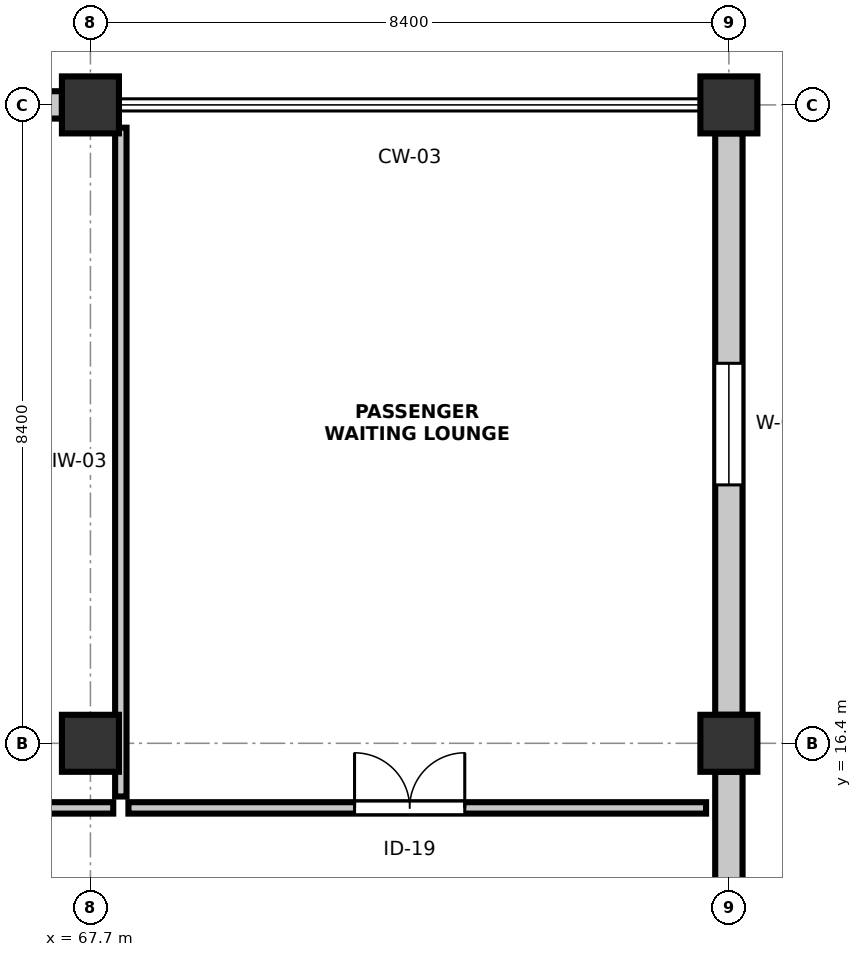
"""IFC4 building model, lengths in metres.
Left out: names, types, materials, properties, quantities, classifications, styles, units other than length and angle.
Written with IfcOpenShell. Run it as: python <this file> out.ifc"""

import sys

from ifc_helpers import new_model, si_unit, direction, frame, frame_2d, origin, origin_2d, place, context, subcontext, project, spatial, rectangle, extrude, element, fill, save


model = new_model("IFC4")
c1 = context("Model", 3, precision=1e-05, world=origin(), true_north=direction((0.0, 1.0)))
c2 = subcontext(c1, "Body", "Model", "MODEL_VIEW")
j1 = project(units=[si_unit("LENGTHUNIT", "METRE"), si_unit("PLANEANGLEUNIT", "RADIAN")], contexts=[c1])
p1 = place(None, origin())
s1 = spatial("IfcSite", under=j1, at=p1, CompositionType="ELEMENT")
p2 = place(p1, origin())
s2 = spatial("IfcBuilding", under=s1, at=p2, CompositionType="ELEMENT")
p3 = place(p2, origin())
s3 = spatial("IfcBuildingStorey", under=s2, at=p3, CompositionType="ELEMENT", Elevation=0.0)
for number, where, z_axis, x_axis in (
    (1, (67.7, 16.4, 0.0), (0.0, 0.0, 1.0), (1.0, 0.0, 0.0)),
    (2, (67.7, 24.8, 0.0), (0.0, 0.0, 1.0), (1.0, 0.0, 0.0)),
    (3, (76.1, 16.4, 0.0), (0.0, 0.0, 1.0), (1.0, 0.0, 0.0)),
    (4, (76.1, 24.8, 0.0), (0.0, 0.0, 1.0), (1.0, 0.0, 0.0)),
):
    element("IfcColumn", number, at=place(p3, frame(where, z_axis=z_axis, x_axis=x_axis)), inside=s3, PredefinedType="COLUMN", context=c2, shape_type="SweptSolid", body=[
        extrude(rectangle(XDim=0.75, YDim=0.75, at=origin_2d()), origin(), (0.0, 0.0, 1.0), 4.8),
    ])
p4 = place(p3, frame((76.1, 8.375, 0.0), z_axis=(0.0, 0.0, 1.0), x_axis=(0.0, 1.0, 0.0)))
e5 = element("IfcWall", 5, at=p4, inside=s3, PredefinedType="STANDARD", context=c2, shape_type="SweptSolid", body=[
    extrude(rectangle(XDim=7.65, YDim=0.36, at=frame_2d((3.825, 0.0))), origin(), (0.0, 0.0, 1.0), 3.785),
])
p5 = place(p4, frame((3.15, 0.0, 0.95)))
e6 = element("IfcOpeningElement", 6, at=p5, cuts=e5, PredefinedType="OPENING", context=c2, shape_type="SweptSolid", body=[
    extrude(rectangle(XDim=1.35, YDim=2.15, at=frame_2d((0.675, 1.075))), frame((0.0, 0.19, 0.0), z_axis=(0.0, -1.0, 0.0), x_axis=(1.0, 0.0, 0.0)), (0.0, 0.0, 1.0), 0.38),
])
p6 = place(p3, frame((76.1, 16.775, 0.0), z_axis=(0.0, 0.0, 1.0), x_axis=(0.0, 1.0, 0.0)))
e7 = element("IfcWall", 7, at=p6, inside=s3, PredefinedType="STANDARD", context=c2, shape_type="SweptSolid", body=[
    extrude(rectangle(XDim=7.65, YDim=0.36, at=frame_2d((3.825, 0.0))), origin(), (0.0, 0.0, 1.0), 3.785),
])
p7 = place(p6, frame((3.025, 0.0, 0.95)))
e8 = element("IfcOpeningElement", 8, at=p7, cuts=e7, PredefinedType="OPENING", context=c2, shape_type="SweptSolid", body=[
    extrude(rectangle(XDim=1.6, YDim=1.45, at=frame_2d((0.8, 0.725))), frame((0.0, 0.19, 0.0), z_axis=(0.0, -1.0, 0.0), x_axis=(1.0, 0.0, 0.0)), (0.0, 0.0, 1.0), 0.38),
])
p8 = place(p3, frame((67.325, 24.8, 0.0), z_axis=(0.0, 0.0, 1.0), x_axis=(-1.0, 0.0, 0.0)))
e9 = element("IfcWall", 9, at=p8, inside=s3, PredefinedType="STANDARD", context=c2, shape_type="SweptSolid", body=[
    extrude(rectangle(XDim=7.65, YDim=0.36, at=frame_2d((3.825, 0.0))), origin(), (0.0, 0.0, 1.0), 3.785),
])
p9 = place(p8, frame((2.875, 0.0, 0.0)))
e10 = element("IfcOpeningElement", 10, at=p9, cuts=e9, PredefinedType="OPENING", context=c2, shape_type="SweptSolid", body=[
    extrude(rectangle(XDim=1.9, YDim=2.3, at=frame_2d((0.95, 1.15))), frame((0.0, 0.19, 0.0), z_axis=(0.0, -1.0, 0.0), x_axis=(1.0, 0.0, 0.0)), (0.0, 0.0, 1.0), 0.38),
])
p10 = place(p3, frame((60.6, 15.55, 0.0), z_axis=(0.0, 0.0, 1.0), x_axis=(1.0, 0.0, 0.0)))
e11 = element("IfcWall", 11, at=p10, inside=s3, PredefinedType="PARTITIONING", context=c2, shape_type="SweptSolid", body=[
    extrude(rectangle(XDim=7.4, YDim=0.15, at=frame_2d((3.7, 0.0))), origin(), (0.0, 0.0, 1.0), 4.535),
])
p11 = place(p10, frame((2.5, 0.0, 0.0)))
e12 = element("IfcOpeningElement", 12, at=p11, cuts=e11, PredefinedType="OPENING", context=c2, shape_type="SweptSolid", body=[
    extrude(rectangle(XDim=1.4, YDim=2.2, at=frame_2d((0.7, 1.1))), frame((0.0, 0.085, 0.0), z_axis=(0.0, -1.0, 0.0), x_axis=(1.0, 0.0, 0.0)), (0.0, 0.0, 1.0), 0.17),
])
p12 = place(p3, frame((68.2, 15.55, 0.0), z_axis=(0.0, 0.0, 1.0), x_axis=(1.0, 0.0, 0.0)))
e13 = element("IfcWall", 13, at=p12, inside=s3, PredefinedType="PARTITIONING", context=c2, shape_type="SweptSolid", body=[
    extrude(rectangle(XDim=7.6, YDim=0.15, at=frame_2d((3.8, 0.0))), origin(), (0.0, 0.0, 1.0), 4.535),
])
p13 = place(p12, frame((2.975, 0.0, 0.0)))
e14 = element("IfcOpeningElement", 14, at=p13, cuts=e13, PredefinedType="OPENING", context=c2, shape_type="SweptSolid", body=[
    extrude(rectangle(XDim=1.45, YDim=2.22, at=frame_2d((0.725, 1.11))), frame((0.0, 0.085, 0.0), z_axis=(0.0, -1.0, 0.0), x_axis=(1.0, 0.0, 0.0)), (0.0, 0.0, 1.0), 0.17),
])
p14 = place(p3, frame((68.1, 15.7, 0.0), z_axis=(0.0, 0.0, 1.0), x_axis=(0.0, 1.0, 0.0)))
e15 = element("IfcWall", 15, at=p14, inside=s3, PredefinedType="PARTITIONING", context=c2, shape_type="SweptSolid", body=[
    extrude(rectangle(XDim=8.8, YDim=0.15, at=frame_2d((4.4, 0.0))), origin(), (0.0, 0.0, 1.0), 3.685),
])
p15 = place(p7, origin())
e16 = element("IfcWindow", 16, at=p15, inside=s3, PartitioningType="SINGLE_PANEL", PredefinedType="WINDOW", context=c2, shape_type="SweptSolid", body=[
    extrude(rectangle(XDim=1.6, YDim=1.45, at=frame_2d((0.8, 0.725))), frame((0.0, 0.03, 0.0), z_axis=(0.0, -1.0, 0.0), x_axis=(1.0, 0.0, 0.0)), (0.0, 0.0, 1.0), 0.06),
])
fill(e8, e16)
p16 = place(p13, origin())
e17 = element("IfcDoor", 17, at=p16, inside=s3, OperationType="DOUBLE_DOOR_SINGLE_SWING", PredefinedType="DOOR", context=c2, shape_type="SweptSolid", body=[
    extrude(rectangle(XDim=1.45, YDim=2.22, at=frame_2d((0.725, 1.11))), frame((0.0, 0.025, 0.0), z_axis=(0.0, -1.0, 0.0), x_axis=(1.0, 0.0, 0.0)), (0.0, 0.0, 1.0), 0.05),
])
fill(e14, e17)
save(model, sys.argv[1])
